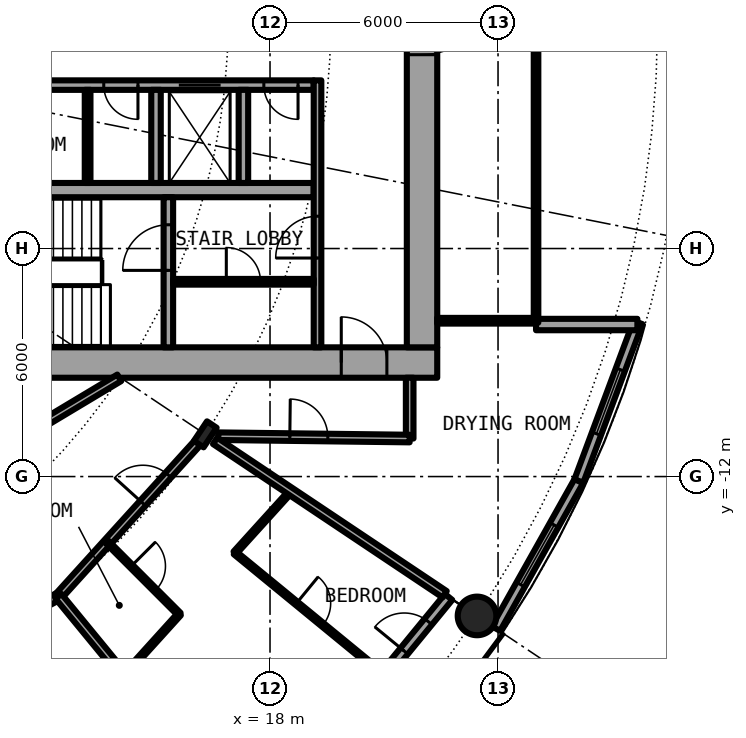
"""IFC4 building model, lengths in metres.
Left out: names, types, materials, properties, quantities, classifications, styles, units other than length and angle.
Written with IfcOpenShell. Run it as: python <this file> out.ifc"""

import sys

from ifc_helpers import new_model, si_unit, direction, frame, frame_2d, origin, origin_2d, place, context, subcontext, project, spatial, rectangle, hollow_circle, i_section, extrude, element, fill, save


model = new_model("IFC4")
c1 = context("Model", 3, precision=1e-05, world=origin(), true_north=direction((0.0, 1.0)))
c2 = subcontext(c1, "Body", "Model", "MODEL_VIEW")
j1 = project(units=[si_unit("LENGTHUNIT", "METRE"), si_unit("PLANEANGLEUNIT", "RADIAN")], contexts=[c1])
p1 = place(None, origin())
s1 = spatial("IfcSite", under=j1, at=p1, CompositionType="ELEMENT")
p2 = place(p1, origin())
s2 = spatial("IfcBuilding", under=s1, at=p2, CompositionType="ELEMENT")
p3 = place(p2, frame((0.0, 0.0, 47.2)))
s3 = spatial("IfcBuildingStorey", under=s2, at=p3, CompositionType="ELEMENT", Elevation=47.2)
p4 = place(p3, frame((23.448, -15.667, 0.0), z_axis=(0.0, 0.0, 1.0), x_axis=(1.0, 0.0, 0.0)))
e1 = element("IfcColumn", 1, at=p4, inside=s3, PredefinedType="COLUMN", context=c2, shape_type="SweptSolid", body=[
    extrude(hollow_circle(Radius=0.508, WallThickness=0.05, at=origin_2d()), origin(), (0.0, 0.0, 1.0), 3.05),
])
p5 = place(p3, frame((16.297, -10.889, 0.0), z_axis=(0.0, 0.0, 1.0), x_axis=(0.831469612303, -0.55557023302, 0.0)))
e2 = element("IfcColumn", 2, at=p5, inside=s3, PredefinedType="COLUMN", context=c2, shape_type="SweptSolid", body=[
    extrude(i_section(OverallWidth=0.305, OverallDepth=0.62, WebThickness=0.021, FlangeThickness=0.04, FilletRadius=0.027, at=origin_2d()), origin(), (0.0, 0.0, 1.0), 3.05),
])
p6 = place(p3, frame((19.304, -19.304, 0.0), z_axis=(0.0, 0.0, 1.0), x_axis=(0.634382322723, 0.773019449054, 0.0)))
e3 = element("IfcWall", 3, at=p6, inside=s3, PredefinedType="SOLIDWALL", context=c2, shape_type="SweptSolid", body=[
    extrude(rectangle(XDim=5.352, YDim=0.25, at=frame_2d((2.676, 0.0))), origin(), (0.0, 0.0, 1.0), 2.7),
])
p7 = place(p6, frame((0.441, 0.0, 0.3)))
e4 = element("IfcOpeningElement", 4, at=p7, cuts=e3, PredefinedType="OPENING", context=c2, shape_type="SweptSolid", body=[
    extrude(rectangle(XDim=1.8, YDim=2.1, at=frame_2d((0.9, 1.05))), frame((0.0, 0.135, 0.0), z_axis=(0.0, -1.0, 0.0), x_axis=(1.0, 0.0, 0.0)), (0.0, 0.0, 1.0), 0.27),
])
p8 = place(p6, frame((3.51, 0.0, 0.0)))
e5 = element("IfcOpeningElement", 5, at=p8, cuts=e3, PredefinedType="OPENING", context=c2, shape_type="SweptSolid", body=[
    extrude(rectangle(XDim=1.0, YDim=2.2, at=frame_2d((0.5, 1.1))), frame((0.0, 0.135, 0.0), z_axis=(0.0, -1.0, 0.0), x_axis=(1.0, 0.0, 0.0)), (0.0, 0.0, 1.0), 0.27),
])
p9 = place(p3, frame((23.946, -16.0, 0.0), z_axis=(0.0, 0.0, 1.0), x_axis=(0.489696356642, 0.871893042919, 0.0)))
e6 = element("IfcWall", 6, at=p9, inside=s3, PredefinedType="SOLIDWALL", context=c2, shape_type="SweptSolid", body=[
    extrude(rectangle(XDim=4.454, YDim=0.25, at=frame_2d((2.227, 0.0))), origin(), (0.0, 0.0, 1.0), 2.7),
])
p10 = place(p9, frame((1.327, 0.0, 0.3)))
e7 = element("IfcOpeningElement", 7, at=p10, cuts=e6, PredefinedType="OPENING", context=c2, shape_type="SweptSolid", body=[
    extrude(rectangle(XDim=1.8, YDim=2.1, at=frame_2d((0.9, 1.05))), frame((0.0, 0.135, 0.0), z_axis=(0.0, -1.0, 0.0), x_axis=(1.0, 0.0, 0.0)), (0.0, 0.0, 1.0), 0.27),
])
p11 = place(p3, frame((26.127, -12.117, 0.0), z_axis=(0.0, 0.0, 1.0), x_axis=(0.349247811493, 0.937030397675, 0.0)))
e8 = element("IfcWall", 8, at=p11, inside=s3, PredefinedType="SOLIDWALL", context=c2, shape_type="SweptSolid", body=[
    extrude(rectangle(XDim=4.452, YDim=0.25, at=frame_2d((2.226, 0.0))), origin(), (0.0, 0.0, 1.0), 2.7),
])
p12 = place(p11, frame((1.327, 0.0, 0.3)))
e9 = element("IfcOpeningElement", 9, at=p12, cuts=e8, PredefinedType="OPENING", context=c2, shape_type="SweptSolid", body=[
    extrude(rectangle(XDim=1.8, YDim=2.1, at=frame_2d((0.9, 1.05))), frame((0.0, 0.135, 0.0), z_axis=(0.0, -1.0, 0.0), x_axis=(1.0, 0.0, 0.0)), (0.0, 0.0, 1.0), 0.27),
])
p13 = place(p3, frame((25.0, -8.0, 0.0), z_axis=(0.0, 0.0, 1.0), x_axis=(1.0, 0.0, 0.0)))
e10 = element("IfcWall", 10, at=p13, inside=s3, PredefinedType="SOLIDWALL", context=c2, shape_type="SweptSolid", body=[
    extrude(rectangle(XDim=2.667, YDim=0.3, at=frame_2d((1.333, 0.0))), origin(), (0.0, 0.0, 1.0), 2.7),
])
p14 = place(p3, frame((8.2, -9.0, 0.0), z_axis=(0.0, 0.0, 1.0), x_axis=(1.0, 0.0, 0.0)))
e11 = element("IfcWall", 11, at=p14, inside=s3, PredefinedType="SHEAR", context=c2, shape_type="SweptSolid", body=[
    extrude(rectangle(XDim=14.2, YDim=0.8, at=frame_2d((7.1, 0.0))), origin(), (0.0, 0.0, 1.0), 3.05),
])
p15 = place(p14, frame((11.675, 0.0, 0.0)))
e12 = element("IfcOpeningElement", 12, at=p15, cuts=e11, PredefinedType="OPENING", context=c2, shape_type="SweptSolid", body=[
    extrude(rectangle(XDim=1.2, YDim=2.3, at=frame_2d((0.6, 1.15))), frame((0.0, 0.41, 0.0), z_axis=(0.0, -1.0, 0.0), x_axis=(1.0, 0.0, 0.0)), (0.0, 0.0, 1.0), 0.82),
])
p16 = place(p3, frame((22.0, 8.6, 0.0), z_axis=(0.0, 0.0, 1.0), x_axis=(0.0, -1.0, 0.0)))
e13 = element("IfcWall", 13, at=p16, inside=s3, PredefinedType="SHEAR", context=c2, shape_type="SweptSolid", body=[
    extrude(rectangle(XDim=17.2, YDim=0.8, at=frame_2d((8.6, 0.0))), origin(), (0.0, 0.0, 1.0), 3.05),
])
p17 = place(p16, frame((7.7, 0.0, 0.0)))
e14 = element("IfcOpeningElement", 14, at=p17, cuts=e13, PredefinedType="OPENING", context=c2, shape_type="SweptSolid", body=[
    extrude(rectangle(XDim=1.8, YDim=2.3, at=frame_2d((0.9, 1.15))), frame((0.0, 0.41, 0.0), z_axis=(0.0, -1.0, 0.0), x_axis=(1.0, 0.0, 0.0)), (0.0, 0.0, 1.0), 0.82),
])
p18 = place(p3, frame((19.15, -1.7, 0.0), z_axis=(0.0, 0.0, 1.0), x_axis=(-1.0, 0.0, 0.0)))
e15 = element("IfcWall", 15, at=p18, inside=s3, PredefinedType="SHEAR", context=c2, shape_type="SweptSolid", body=[
    extrude(rectangle(XDim=10.15, YDim=0.25, at=frame_2d((5.075, 0.0))), origin(), (0.0, 0.0, 1.0), 3.05),
])
p19 = place(p18, frame((2.45, 0.0, 0.0)))
e16 = element("IfcOpeningElement", 16, at=p19, cuts=e15, PredefinedType="OPENING", context=c2, shape_type="SweptSolid", body=[
    extrude(rectangle(XDim=1.1, YDim=2.3, at=frame_2d((0.55, 1.15))), frame((0.0, 0.135, 0.0), z_axis=(0.0, -1.0, 0.0), x_axis=(1.0, 0.0, 0.0)), (0.0, 0.0, 1.0), 0.27),
])
p20 = place(p18, frame((7.637, 0.0, 0.0)))
e17 = element("IfcOpeningElement", 17, at=p20, cuts=e15, PredefinedType="OPENING", context=c2, shape_type="SweptSolid", body=[
    extrude(rectangle(XDim=0.9, YDim=2.3, at=frame_2d((0.45, 1.15))), frame((0.0, 0.135, 0.0), z_axis=(0.0, -1.0, 0.0), x_axis=(1.0, 0.0, 0.0)), (0.0, 0.0, 1.0), 0.27),
])
p21 = place(p18, frame((4.625, 0.0, 0.0)))
e18 = element("IfcOpeningElement", 18, at=p21, cuts=e15, PredefinedType="OPENING", context=c2, shape_type="SweptSolid", body=[
    extrude(rectangle(XDim=0.9, YDim=2.3, at=frame_2d((0.45, 1.15))), frame((0.0, 0.135, 0.0), z_axis=(0.0, -1.0, 0.0), x_axis=(1.0, 0.0, 0.0)), (0.0, 0.0, 1.0), 0.27),
])
p22 = place(p18, frame((0.413, 0.0, 0.0)))
e19 = element("IfcOpeningElement", 19, at=p22, cuts=e15, PredefinedType="OPENING", context=c2, shape_type="SweptSolid", body=[
    extrude(rectangle(XDim=0.9, YDim=2.3, at=frame_2d((0.45, 1.15))), frame((0.0, 0.135, 0.0), z_axis=(0.0, -1.0, 0.0), x_axis=(1.0, 0.0, 0.0)), (0.0, 0.0, 1.0), 0.27),
])
p23 = place(p3, frame((9.0, -4.462, 0.0), z_axis=(0.0, 0.0, 1.0), x_axis=(1.0, 0.0, 0.0)))
e20 = element("IfcWall", 20, at=p23, inside=s3, PredefinedType="SHEAR", context=c2, shape_type="SweptSolid", body=[
    extrude(rectangle(XDim=10.15, YDim=0.375, at=frame_2d((5.075, 0.0))), origin(), (0.0, 0.0, 1.0), 3.05),
])
p24 = place(p3, frame((15.325, -8.6, 0.0), z_axis=(0.0, 0.0, 1.0), x_axis=(0.0, 1.0, 0.0)))
e21 = element("IfcWall", 21, at=p24, inside=s3, PredefinedType="SHEAR", context=c2, shape_type="SweptSolid", body=[
    extrude(rectangle(XDim=3.95, YDim=0.25, at=frame_2d((1.975, 0.0))), origin(), (0.0, 0.0, 1.0), 3.05),
])
p25 = place(p24, frame((2.025, 0.0, 0.0)))
e22 = element("IfcOpeningElement", 22, at=p25, cuts=e21, PredefinedType="OPENING", context=c2, shape_type="SweptSolid", body=[
    extrude(rectangle(XDim=1.2, YDim=2.3, at=frame_2d((0.6, 1.15))), frame((0.0, 0.135, 0.0), z_axis=(0.0, -1.0, 0.0), x_axis=(1.0, 0.0, 0.0)), (0.0, 0.0, 1.0), 0.27),
])
for number, where, z_axis, x_axis in (
    (23, (15.0, -1.825, 0.0), (0.0, 0.0, 1.0), (0.0, -1.0, 0.0)),
    (24, (17.3, -1.825, 0.0), (0.0, 0.0, 1.0), (0.0, -1.0, 0.0)),
):
    element("IfcWall", number, at=place(p3, frame(where, z_axis=z_axis, x_axis=x_axis)), inside=s3, PredefinedType="SOLIDWALL", context=c2, shape_type="SweptSolid", body=[
        extrude(rectangle(XDim=2.45, YDim=0.25, at=frame_2d((1.225, 0.0))), origin(), (0.0, 0.0, 1.0), 2.7),
    ])
p26 = place(p3, frame((19.25, -8.6, 0.0), z_axis=(0.0, 0.0, 1.0), x_axis=(0.0, 1.0, 0.0)))
e25 = element("IfcWall", 25, at=p26, inside=s3, PredefinedType="SOLIDWALL", context=c2, shape_type="SweptSolid", body=[
    extrude(rectangle(XDim=7.025, YDim=0.2, at=frame_2d((3.513, 0.0))), origin(), (0.0, 0.0, 1.0), 2.7),
])
p27 = place(p26, frame((2.35, 0.0, 0.0)))
e26 = element("IfcOpeningElement", 26, at=p27, cuts=e25, PredefinedType="OPENING", context=c2, shape_type="SweptSolid", body=[
    extrude(rectangle(XDim=1.1, YDim=2.3, at=frame_2d((0.55, 1.15))), frame((0.0, 0.11, 0.0), z_axis=(0.0, -1.0, 0.0), x_axis=(1.0, 0.0, 0.0)), (0.0, 0.0, 1.0), 0.22),
])
p28 = place(p3, frame((13.2, -1.825, 0.0), z_axis=(0.0, 0.0, 1.0), x_axis=(0.0, -1.0, 0.0)))
e27 = element("IfcWall", 27, at=p28, inside=s3, PredefinedType="PARTITIONING", context=c2, shape_type="SweptSolid", body=[
    extrude(rectangle(XDim=2.45, YDim=0.15, at=frame_2d((1.225, 0.0))), origin(), (0.0, 0.0, 1.0), 2.7),
])
p29 = place(p3, frame((15.45, -6.875, 0.0), z_axis=(0.0, 0.0, 1.0), x_axis=(1.0, 0.0, 0.0)))
e28 = element("IfcWall", 28, at=p29, inside=s3, PredefinedType="PARTITIONING", context=c2, shape_type="SweptSolid", body=[
    extrude(rectangle(XDim=3.7, YDim=0.15, at=frame_2d((1.85, 0.0))), origin(), (0.0, 0.0, 1.0), 2.7),
])
p30 = place(p29, frame((1.4, 0.0, 0.0)))
e29 = element("IfcOpeningElement", 29, at=p30, cuts=e28, PredefinedType="OPENING", context=c2, shape_type="SweptSolid", body=[
    extrude(rectangle(XDim=0.9, YDim=2.3, at=frame_2d((0.45, 1.15))), frame((0.0, 0.085, 0.0), z_axis=(0.0, -1.0, 0.0), x_axis=(1.0, 0.0, 0.0)), (0.0, 0.0, 1.0), 0.17),
])
p31 = place(p3, frame((22.4, -7.9, 0.0), z_axis=(0.0, 0.0, 1.0), x_axis=(1.0, 0.0, 0.0)))
e30 = element("IfcWall", 30, at=p31, inside=s3, PredefinedType="PARTITIONING", context=c2, shape_type="SweptSolid", body=[
    extrude(rectangle(XDim=2.54, YDim=0.15, at=frame_2d((1.27, 0.0))), origin(), (0.0, 0.0, 1.0), 2.7),
])
p32 = place(p3, frame((25.0, -7.95, 0.0), z_axis=(0.0, 0.0, 1.0), x_axis=(0.0, 1.0, 0.0)))
e31 = element("IfcWall", 31, at=p32, inside=s3, PredefinedType="PARTITIONING", context=c2, shape_type="SweptSolid", body=[
    extrude(rectangle(XDim=15.9, YDim=0.12, at=frame_2d((7.95, 0.0))), origin(), (0.0, 0.0, 1.0), 2.7),
])
p33 = place(p32, frame((0.95, 0.0, 0.1)))
e32 = element("IfcOpeningElement", 32, at=p33, cuts=e31, PredefinedType="OPENING", context=c2, shape_type="SweptSolid", body=[
    extrude(rectangle(XDim=14.0, YDim=2.35, at=frame_2d((7.0, 1.175))), frame((0.0, 0.07, 0.0), z_axis=(0.0, -1.0, 0.0), x_axis=(1.0, 0.0, 0.0)), (0.0, 0.0, 1.0), 0.14),
])
p34 = place(p3, frame((14.153, -17.234, 0.0), z_axis=(0.0, 0.0, 1.0), x_axis=(0.671144831591, 0.741326254107, 0.0)))
e33 = element("IfcWall", 33, at=p34, inside=s3, PredefinedType="PARTITIONING", context=c2, shape_type="SweptSolid", body=[
    extrude(rectangle(XDim=2.181, YDim=0.1, at=frame_2d((1.091, 0.0))), origin(), (0.0, 0.0, 1.0), 2.7),
])
p35 = place(p3, frame((17.077, -14.006, 0.0), z_axis=(0.0, 0.0, 1.0), x_axis=(0.671396556615, 0.741098282123, 0.0)))
e34 = element("IfcWall", 34, at=p35, inside=s3, PredefinedType="PARTITIONING", context=c2, shape_type="SweptSolid", body=[
    extrude(rectangle(XDim=2.182, YDim=0.1, at=frame_2d((1.091, 0.0))), origin(), (0.0, 0.0, 1.0), 2.7),
])
p36 = place(p3, frame((21.675, -11.0, 0.0), z_axis=(0.0, 0.0, 1.0), x_axis=(0.0, 1.0, 0.0)))
e35 = element("IfcWall", 35, at=p36, inside=s3, PredefinedType="PARTITIONING", context=c2, shape_type="SweptSolid", body=[
    extrude(rectangle(XDim=1.6, YDim=0.2, at=frame_2d((0.8, 0.0))), origin(), (0.0, 0.0, 1.0), 2.7),
])
p37 = place(p3, frame((12.434, -15.151, 0.0), z_axis=(0.0, 0.0, 1.0), x_axis=(0.671514934772, 0.740991020444, 0.0)))
e36 = element("IfcWall", 36, at=p37, inside=s3, PredefinedType="PARTITIONING", context=c2, shape_type="SweptSolid", body=[
    extrude(rectangle(XDim=5.598, YDim=0.2, at=frame_2d((2.799, 0.0))), origin(), (0.0, 0.0, 1.0), 2.38),
])
p38 = place(p37, frame((3.305, 0.0, 0.0)))
e37 = element("IfcOpeningElement", 37, at=p38, cuts=e36, PredefinedType="OPENING", context=c2, shape_type="SweptSolid", body=[
    extrude(rectangle(XDim=1.0, YDim=2.3, at=frame_2d((0.5, 1.15))), frame((0.0, 0.11, 0.0), z_axis=(0.0, -1.0, 0.0), x_axis=(1.0, 0.0, 0.0)), (0.0, 0.0, 1.0), 0.22),
])
p39 = place(p3, frame((10.867, -15.989, 0.0), z_axis=(0.0, 0.0, 1.0), x_axis=(0.881596178172, 0.472004426496, 0.0)))
e38 = element("IfcWall", 38, at=p39, inside=s3, PredefinedType="PARTITIONING", context=c2, shape_type="SweptSolid", body=[
    extrude(rectangle(XDim=1.78, YDim=0.2, at=frame_2d((0.89, 0.0))), origin(), (0.0, 0.0, 1.0), 2.38),
])
p40 = place(p3, frame((1.656, -16.819, 0.0), z_axis=(0.0, 0.0, 1.0), x_axis=(0.857773470126, 0.514027892189, 0.0)))
e39 = element("IfcWall", 39, at=p40, inside=s3, PredefinedType="PARTITIONING", context=c2, shape_type="SweptSolid", body=[
    extrude(rectangle(XDim=14.429, YDim=0.2, at=frame_2d((7.215, 0.0))), origin(), (0.0, 0.0, 1.0), 2.7),
])
p41 = place(p40, frame((4.318, 0.0, 0.0)))
e40 = element("IfcOpeningElement", 40, at=p41, cuts=e39, PredefinedType="OPENING", context=c2, shape_type="SweptSolid", body=[
    extrude(rectangle(XDim=1.0, YDim=2.3, at=frame_2d((0.5, 1.15))), frame((0.0, 0.11, 0.0), z_axis=(0.0, -1.0, 0.0), x_axis=(1.0, 0.0, 0.0)), (0.0, 0.0, 1.0), 0.22),
])
p42 = place(p3, frame((16.637, -10.938, 0.0), z_axis=(0.0, 0.0, 1.0), x_axis=(0.99992425795, -0.012307654658, 0.0)))
e41 = element("IfcWall", 41, at=p42, inside=s3, PredefinedType="PARTITIONING", context=c2, shape_type="SweptSolid", body=[
    extrude(rectangle(XDim=5.039, YDim=0.2, at=frame_2d((2.519, 0.0))), origin(), (0.0, 0.0, 1.0), 2.7),
])
p43 = place(p42, frame((1.884, 0.0, 0.0)))
e42 = element("IfcOpeningElement", 42, at=p43, cuts=e41, PredefinedType="OPENING", context=c2, shape_type="SweptSolid", body=[
    extrude(rectangle(XDim=1.0, YDim=2.3, at=frame_2d((0.5, 1.15))), frame((0.0, 0.11, 0.0), z_axis=(0.0, -1.0, 0.0), x_axis=(1.0, 0.0, 0.0)), (0.0, 0.0, 1.0), 0.22),
])
p44 = place(p3, frame((12.434, -15.151, 0.0), z_axis=(0.0, 0.0, 1.0), x_axis=(0.634381303318, -0.773020285633, 0.0)))
e43 = element("IfcWall", 43, at=p44, inside=s3, PredefinedType="PARTITIONING", context=c2, shape_type="SweptSolid", body=[
    extrude(rectangle(XDim=7.576, YDim=0.2, at=frame_2d((3.788, 0.0))), origin(), (0.0, 0.0, 1.0), 2.7),
])
p45 = place(p3, frame((13.722, -13.73, 0.0), z_axis=(0.0, 0.0, 1.0), x_axis=(0.706741540154, -0.707471833659, 0.0)))
e44 = element("IfcWall", 44, at=p45, inside=s3, PredefinedType="PARTITIONING", context=c2, shape_type="SweptSolid", body=[
    extrude(rectangle(XDim=2.674, YDim=0.1, at=frame_2d((1.337, 0.0))), origin(), (0.0, 0.0, 1.0), 2.7),
])
p46 = place(p45, frame((0.887, 0.0, 0.0)))
e45 = element("IfcOpeningElement", 45, at=p46, cuts=e44, PredefinedType="OPENING", context=c2, shape_type="SweptSolid", body=[
    extrude(rectangle(XDim=0.9, YDim=2.3, at=frame_2d((0.45, 1.15))), frame((0.0, 0.06, 0.0), z_axis=(0.0, -1.0, 0.0), x_axis=(1.0, 0.0, 0.0)), (0.0, 0.0, 1.0), 0.12),
])
p47 = place(p3, frame((16.555, -11.061, 0.0), z_axis=(0.0, 0.0, 1.0), x_axis=(0.831465568067, -0.555576285599, 0.0)))
e46 = element("IfcWall", 46, at=p47, inside=s3, PredefinedType="PARTITIONING", context=c2, shape_type="SweptSolid", body=[
    extrude(rectangle(XDim=7.264, YDim=0.2, at=frame_2d((3.632, 0.0))), origin(), (0.0, 0.0, 1.0), 2.7),
])
p48 = place(p3, frame((17.077, -14.006, 0.0), z_axis=(0.0, 0.0, 1.0), x_axis=(0.77326214499, -0.634086472908, 0.0)))
e47 = element("IfcWall", 47, at=p48, inside=s3, PredefinedType="PARTITIONING", context=c2, shape_type="SweptSolid", body=[
    extrude(rectangle(XDim=5.089, YDim=0.1, at=frame_2d((2.544, 0.0))), origin(), (0.0, 0.0, 1.0), 2.7),
])
p49 = place(p48, frame((2.094, 0.0, 0.0)))
e48 = element("IfcOpeningElement", 48, at=p49, cuts=e47, PredefinedType="OPENING", context=c2, shape_type="SweptSolid", body=[
    extrude(rectangle(XDim=0.9, YDim=2.3, at=frame_2d((0.45, 1.15))), frame((0.0, 0.06, 0.0), z_axis=(0.0, -1.0, 0.0), x_axis=(1.0, 0.0, 0.0)), (0.0, 0.0, 1.0), 0.12),
])
p50 = place(p8, origin())
e49 = element("IfcDoor", 49, at=p50, inside=s3, OperationType="SINGLE_SWING_LEFT", PredefinedType="DOOR", context=c2, shape_type="SweptSolid", body=[
    extrude(rectangle(XDim=1.0, YDim=2.2, at=frame_2d((0.5, 1.1))), frame((0.0, 0.025, 0.0), z_axis=(0.0, -1.0, 0.0), x_axis=(1.0, 0.0, 0.0)), (0.0, 0.0, 1.0), 0.05),
])
fill(e5, e49)
p51 = place(p10, origin())
e50 = element("IfcWindow", 50, at=p51, inside=s3, PartitioningType="SINGLE_PANEL", PredefinedType="WINDOW", context=c2, shape_type="SweptSolid", body=[
    extrude(rectangle(XDim=1.8, YDim=2.1, at=frame_2d((0.9, 1.05))), frame((0.0, 0.03, 0.0), z_axis=(0.0, -1.0, 0.0), x_axis=(1.0, 0.0, 0.0)), (0.0, 0.0, 1.0), 0.06),
])
fill(e7, e50)
p52 = place(p12, origin())
e51 = element("IfcWindow", 51, at=p52, inside=s3, PartitioningType="SINGLE_PANEL", PredefinedType="WINDOW", context=c2, shape_type="SweptSolid", body=[
    extrude(rectangle(XDim=1.8, YDim=2.1, at=frame_2d((0.9, 1.05))), frame((0.0, 0.03, 0.0), z_axis=(0.0, -1.0, 0.0), x_axis=(1.0, 0.0, 0.0)), (0.0, 0.0, 1.0), 0.06),
])
fill(e9, e51)
p53 = place(p19, origin())
e52 = element("IfcDoor", 52, at=p53, inside=s3, OperationType="DOUBLE_DOOR_SLIDING", PredefinedType="DOOR", context=c2, shape_type="SweptSolid", body=[
    extrude(rectangle(XDim=1.1, YDim=2.3, at=frame_2d((0.55, 1.15))), frame((0.0, 0.025, 0.0), z_axis=(0.0, -1.0, 0.0), x_axis=(1.0, 0.0, 0.0)), (0.0, 0.0, 1.0), 0.05),
])
fill(e16, e52)
p54 = place(p21, origin())
e53 = element("IfcDoor", 53, at=p54, inside=s3, OperationType="SINGLE_SWING_LEFT", PredefinedType="DOOR", context=c2, shape_type="SweptSolid", body=[
    extrude(rectangle(XDim=0.9, YDim=2.3, at=frame_2d((0.45, 1.15))), frame((0.0, 0.025, 0.0), z_axis=(0.0, -1.0, 0.0), x_axis=(1.0, 0.0, 0.0)), (0.0, 0.0, 1.0), 0.05),
])
fill(e18, e53)
p55 = place(p22, origin())
e54 = element("IfcDoor", 54, at=p55, inside=s3, OperationType="SINGLE_SWING_RIGHT", PredefinedType="DOOR", context=c2, shape_type="SweptSolid", body=[
    extrude(rectangle(XDim=0.9, YDim=2.3, at=frame_2d((0.45, 1.15))), frame((0.0, 0.025, 0.0), z_axis=(0.0, -1.0, 0.0), x_axis=(1.0, 0.0, 0.0)), (0.0, 0.0, 1.0), 0.05),
])
fill(e19, e54)
p56 = place(p30, origin())
e55 = element("IfcDoor", 55, at=p56, inside=s3, OperationType="SINGLE_SWING_LEFT", PredefinedType="DOOR", context=c2, shape_type="SweptSolid", body=[
    extrude(rectangle(XDim=0.9, YDim=2.3, at=frame_2d((0.45, 1.15))), frame((0.0, 0.025, 0.0), z_axis=(0.0, -1.0, 0.0), x_axis=(1.0, 0.0, 0.0)), (0.0, 0.0, 1.0), 0.05),
])
fill(e29, e55)
p57 = place(p25, origin())
e56 = element("IfcDoor", 56, at=p57, inside=s3, OperationType="SINGLE_SWING_LEFT", PredefinedType="DOOR", context=c2, shape_type="SweptSolid", body=[
    extrude(rectangle(XDim=1.2, YDim=2.3, at=frame_2d((0.6, 1.15))), frame((0.0, 0.025, 0.0), z_axis=(0.0, -1.0, 0.0), x_axis=(1.0, 0.0, 0.0)), (0.0, 0.0, 1.0), 0.05),
])
fill(e22, e56)
p58 = place(p27, origin())
e57 = element("IfcDoor", 57, at=p58, inside=s3, OperationType="SINGLE_SWING_RIGHT", PredefinedType="DOOR", context=c2, shape_type="SweptSolid", body=[
    extrude(rectangle(XDim=1.1, YDim=2.3, at=frame_2d((0.55, 1.15))), frame((0.0, 0.025, 0.0), z_axis=(0.0, -1.0, 0.0), x_axis=(1.0, 0.0, 0.0)), (0.0, 0.0, 1.0), 0.05),
])
fill(e26, e57)
p59 = place(p15, origin())
e58 = element("IfcDoor", 58, at=p59, inside=s3, OperationType="SINGLE_SWING_LEFT", PredefinedType="DOOR", context=c2, shape_type="SweptSolid", body=[
    extrude(rectangle(XDim=1.2, YDim=2.3, at=frame_2d((0.6, 1.15))), frame((0.0, 0.025, 0.0), z_axis=(0.0, -1.0, 0.0), x_axis=(1.0, 0.0, 0.0)), (0.0, 0.0, 1.0), 0.05),
])
fill(e12, e58)
p60 = place(p17, origin())
e59 = element("IfcDoor", 59, at=p60, inside=s3, OperationType="SINGLE_SWING_LEFT", PredefinedType="DOOR", context=c2, shape_type="SweptSolid", body=[
    extrude(rectangle(XDim=1.8, YDim=2.3, at=frame_2d((0.9, 1.15))), frame((0.0, 0.025, 0.0), z_axis=(0.0, -1.0, 0.0), x_axis=(1.0, 0.0, 0.0)), (0.0, 0.0, 1.0), 0.05),
])
fill(e14, e59)
p61 = place(p33, origin())
e60 = element("IfcWindow", 60, at=p61, inside=s3, PartitioningType="SINGLE_PANEL", PredefinedType="WINDOW", context=c2, shape_type="SweptSolid", body=[
    extrude(rectangle(XDim=14.0, YDim=2.35, at=frame_2d((7.0, 1.175))), frame((0.0, 0.03, 0.0), z_axis=(0.0, -1.0, 0.0), x_axis=(1.0, 0.0, 0.0)), (0.0, 0.0, 1.0), 0.06),
])
fill(e32, e60)
p62 = place(p38, origin())
e61 = element("IfcDoor", 61, at=p62, inside=s3, OperationType="SINGLE_SWING_RIGHT", PredefinedType="DOOR", context=c2, shape_type="SweptSolid", body=[
    extrude(rectangle(XDim=1.0, YDim=2.3, at=frame_2d((0.5, 1.15))), frame((0.0, 0.025, 0.0), z_axis=(0.0, -1.0, 0.0), x_axis=(1.0, 0.0, 0.0)), (0.0, 0.0, 1.0), 0.05),
])
fill(e37, e61)
p63 = place(p46, origin())
e62 = element("IfcDoor", 62, at=p63, inside=s3, OperationType="SINGLE_SWING_RIGHT", PredefinedType="DOOR", context=c2, shape_type="SweptSolid", body=[
    extrude(rectangle(XDim=0.9, YDim=2.3, at=frame_2d((0.45, 1.15))), frame((0.0, 0.025, 0.0), z_axis=(0.0, -1.0, 0.0), x_axis=(1.0, 0.0, 0.0)), (0.0, 0.0, 1.0), 0.05),
])
fill(e45, e62)
p64 = place(p49, origin())
e63 = element("IfcDoor", 63, at=p64, inside=s3, OperationType="SINGLE_SWING_LEFT", PredefinedType="DOOR", context=c2, shape_type="SweptSolid", body=[
    extrude(rectangle(XDim=0.9, YDim=2.3, at=frame_2d((0.45, 1.15))), frame((0.0, 0.025, 0.0), z_axis=(0.0, -1.0, 0.0), x_axis=(1.0, 0.0, 0.0)), (0.0, 0.0, 1.0), 0.05),
])
fill(e48, e63)
p65 = place(p43, origin())
e64 = element("IfcDoor", 64, at=p65, inside=s3, OperationType="SINGLE_SWING_LEFT", PredefinedType="DOOR", context=c2, shape_type="SweptSolid", body=[
    extrude(rectangle(XDim=1.0, YDim=2.3, at=frame_2d((0.5, 1.15))), frame((0.0, 0.025, 0.0), z_axis=(0.0, -1.0, 0.0), x_axis=(1.0, 0.0, 0.0)), (0.0, 0.0, 1.0), 0.05),
])
fill(e42, e64)
save(model, sys.argv[1])
